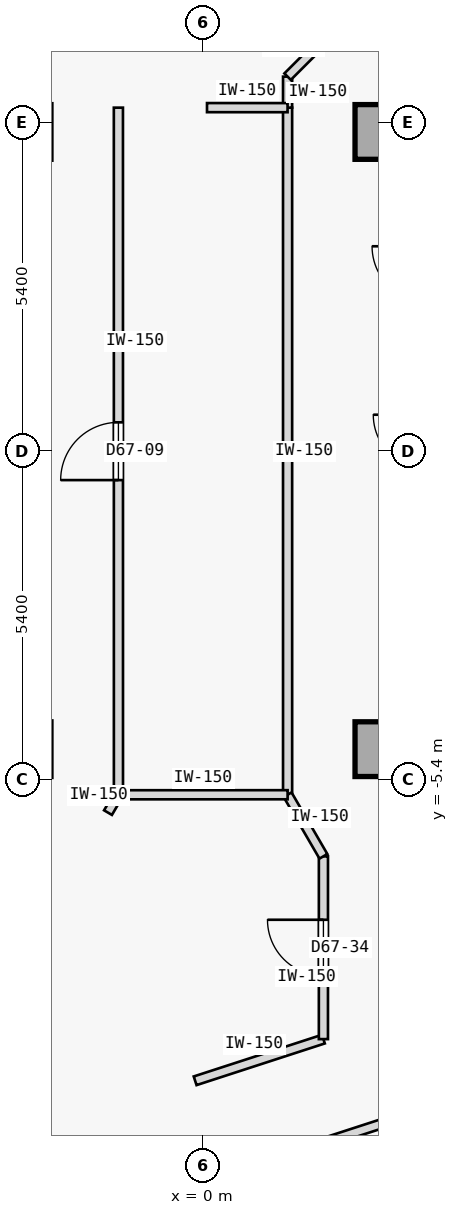
"""IFC4 building model, lengths in metres.
Left out: names, types, materials, properties, quantities, classifications, styles, units other than length and angle.
Written with IfcOpenShell. Run it as: python <this file> out.ifc"""

import sys

from ifc_helpers import new_model, si_unit, direction, frame, frame_2d, origin, origin_2d, place, context, subcontext, project, spatial, rectangle, extrude, element, fill, save


model = new_model("IFC4")
c1 = context("Model", 3, precision=1e-05, world=origin(), true_north=direction((0.0, 1.0)))
c2 = subcontext(c1, "Body", "Model", "MODEL_VIEW")
j1 = project(units=[si_unit("LENGTHUNIT", "METRE"), si_unit("PLANEANGLEUNIT", "RADIAN")], contexts=[c1])
p1 = place(None, origin())
s1 = spatial("IfcSite", under=j1, at=p1, CompositionType="ELEMENT")
p2 = place(p1, origin())
s2 = spatial("IfcBuilding", under=s1, at=p2, CompositionType="ELEMENT")
p3 = place(p2, frame((0.0, 0.0, 251.1)))
s3 = spatial("IfcBuildingStorey", under=s2, at=p3, CompositionType="ELEMENT", Elevation=251.1)
for number, where, z_axis, x_axis in (
    (1, (2.95, -4.9, 0.0), (0.0, 0.0, 1.0), (1.0, 0.0, 0.0)),
    (2, (2.95, 5.25, 0.0), (0.0, 0.0, 1.0), (1.0, 0.0, 0.0)),
):
    element("IfcColumn", number, at=place(p3, frame(where, z_axis=z_axis, x_axis=x_axis)), inside=s3, PredefinedType="COLUMN", context=c2, shape_type="SweptSolid", body=[
        extrude(rectangle(XDim=0.9, YDim=0.9, at=origin_2d()), origin(), (0.0, 0.0, 1.0), 3.35),
    ])
p4 = place(p3, frame((-1.391, -5.65, 0.0), z_axis=(0.0, 0.0, 1.0), x_axis=(-8.6422954e-05, 0.999999996266, 0.0)))
e3 = element("IfcWall", 3, at=p4, inside=s3, PredefinedType="PARTITIONING", context=c2, shape_type="SweptSolid", body=[
    extrude(rectangle(XDim=11.3, YDim=0.15, at=frame_2d((5.65, 0.0))), origin(), (0.0, 0.0, 1.0), 2.95),
])
p5 = place(p4, frame((5.175, 0.0, 0.0)))
e4 = element("IfcOpeningElement", 4, at=p5, cuts=e3, PredefinedType="OPENING", context=c2, shape_type="SweptSolid", body=[
    extrude(rectangle(XDim=0.95, YDim=2.15, at=frame_2d((0.475, 1.075))), frame((0.0, 0.085, 0.0), z_axis=(0.0, -1.0, 0.0), x_axis=(1.0, 0.0, 0.0)), (0.0, 0.0, 1.0), 0.17),
])
p6 = place(p3, frame((1.391, -5.648, 0.0), z_axis=(0.0, 0.0, 1.0), x_axis=(-4.3218947e-05, 0.999999999066, 0.0)))
e5 = element("IfcWall", 5, at=p6, inside=s3, PredefinedType="PARTITIONING", context=c2, shape_type="SweptSolid", body=[
    extrude(rectangle(XDim=11.298, YDim=0.15, at=frame_2d((5.649, 0.0))), origin(), (0.0, 0.0, 1.0), 2.95),
])
p7 = place(p3, frame((-1.643, -12.549, 0.0), z_axis=(0.0, 0.0, 1.0), x_axis=(0.951058161173, 0.309011931914, 0.0)))
e6 = element("IfcWall", 6, at=p7, inside=s3, PredefinedType="PARTITIONING", context=c2, shape_type="SweptSolid", body=[
    extrude(rectangle(XDim=7.297, YDim=0.15, at=frame_2d((3.648, 0.0))), origin(), (0.0, 0.0, 1.0), 2.95),
])
p8 = place(p3, frame((-0.129, -10.354, 0.0), z_axis=(0.0, 0.0, 1.0), x_axis=(0.951066420845, 0.308986509643, 0.0)))
e7 = element("IfcWall", 7, at=p8, inside=s3, PredefinedType="PARTITIONING", context=c2, shape_type="SweptSolid", body=[
    extrude(rectangle(XDim=2.218, YDim=0.15, at=frame_2d((1.109, 0.0))), origin(), (0.0, 0.0, 1.0), 2.95),
])
p9 = place(p3, frame((-1.562, -5.944, 0.0), z_axis=(0.0, 0.0, 1.0), x_axis=(0.505387839696, 0.862892305845, 0.0)))
e8 = element("IfcWall", 8, at=p9, inside=s3, PredefinedType="PARTITIONING", context=c2, shape_type="SweptSolid", body=[
    extrude(rectangle(XDim=0.34, YDim=0.15, at=frame_2d((0.17, 0.0))), origin(), (0.0, 0.0, 1.0), 2.95),
])
p10 = place(p3, frame((1.98, -9.668, 0.0), z_axis=(0.0, 0.0, 1.0), x_axis=(8.1241368e-05, 0.9999999967, 0.0)))
e9 = element("IfcWall", 9, at=p10, inside=s3, PredefinedType="PARTITIONING", context=c2, shape_type="SweptSolid", body=[
    extrude(rectangle(XDim=3.005, YDim=0.15, at=frame_2d((1.502, 0.0))), origin(), (0.0, 0.0, 1.0), 2.95),
])
p11 = place(p10, frame((1.042, 0.0, 0.0)))
e10 = element("IfcOpeningElement", 10, at=p11, cuts=e9, PredefinedType="OPENING", context=c2, shape_type="SweptSolid", body=[
    extrude(rectangle(XDim=0.92, YDim=2.15, at=frame_2d((0.46, 1.075))), frame((0.0, 0.085, 0.0), z_axis=(0.0, -1.0, 0.0), x_axis=(1.0, 0.0, 0.0)), (0.0, 0.0, 1.0), 0.17),
])
p12 = place(p3, frame((1.391, -5.649, 0.0), z_axis=(0.0, 0.0, 1.0), x_axis=(0.502522642426, -0.864564048437, 0.0)))
e11 = element("IfcWall", 11, at=p12, inside=s3, PredefinedType="PARTITIONING", context=c2, shape_type="SweptSolid", body=[
    extrude(rectangle(XDim=1.171, YDim=0.15, at=frame_2d((0.586, 0.0))), origin(), (0.0, 0.0, 1.0), 2.95),
])
p13 = place(p3, frame((1.391, 5.649, 0.0), z_axis=(0.0, 0.0, 1.0), x_axis=(0.000957395444, 0.999999541697, 0.0)))
e12 = element("IfcWall", 12, at=p13, inside=s3, PredefinedType="PARTITIONING", context=c2, shape_type="SweptSolid", body=[
    extrude(rectangle(XDim=0.51, YDim=0.15, at=frame_2d((0.255, 0.0))), origin(), (0.0, 0.0, 1.0), 2.95),
])
p14 = place(p3, frame((1.391, 6.159, 0.0), z_axis=(0.0, 0.0, 1.0), x_axis=(0.707106781187, 0.707106781187, 0.0)))
e13 = element("IfcWall", 13, at=p14, inside=s3, PredefinedType="PARTITIONING", context=c2, shape_type="SweptSolid", body=[
    extrude(rectangle(XDim=0.833, YDim=0.15, at=frame_2d((0.417, 0.0))), origin(), (0.0, 0.0, 1.0), 2.95),
])
p15 = place(p3, frame((-1.391, -5.65, 0.0), z_axis=(0.0, 0.0, 1.0), x_axis=(0.999999965344, 0.000263273356, 0.0)))
e14 = element("IfcWall", 14, at=p15, inside=s3, PredefinedType="PARTITIONING", context=c2, shape_type="SweptSolid", body=[
    extrude(rectangle(XDim=2.782, YDim=0.15, at=frame_2d((1.391, 0.0))), origin(), (0.0, 0.0, 1.0), 2.95),
])
p16 = place(p3, frame((0.066, 5.65, 0.0), z_axis=(0.0, 0.0, 1.0), x_axis=(0.999999932094, -0.000368527707, 0.0)))
e15 = element("IfcWall", 15, at=p16, inside=s3, PredefinedType="PARTITIONING", context=c2, shape_type="SweptSolid", body=[
    extrude(rectangle(XDim=1.325, YDim=0.15, at=frame_2d((0.663, 0.0))), origin(), (0.0, 0.0, 1.0), 2.95),
])
p17 = place(p5, origin())
e16 = element("IfcDoor", 16, at=p17, inside=s3, OperationType="SINGLE_SWING_LEFT", PredefinedType="DOOR", context=c2, shape_type="SweptSolid", body=[
    extrude(rectangle(XDim=0.95, YDim=2.15, at=frame_2d((0.475, 1.075))), frame((0.0, 0.025, 0.0), z_axis=(0.0, -1.0, 0.0), x_axis=(1.0, 0.0, 0.0)), (0.0, 0.0, 1.0), 0.05),
])
fill(e4, e16)
p18 = place(p11, origin())
e17 = element("IfcDoor", 17, at=p18, inside=s3, OperationType="SINGLE_SWING_RIGHT", PredefinedType="DOOR", context=c2, shape_type="SweptSolid", body=[
    extrude(rectangle(XDim=0.92, YDim=2.15, at=frame_2d((0.46, 1.075))), frame((0.0, 0.025, 0.0), z_axis=(0.0, -1.0, 0.0), x_axis=(1.0, 0.0, 0.0)), (0.0, 0.0, 1.0), 0.05),
])
fill(e10, e17)
save(model, sys.argv[1])
